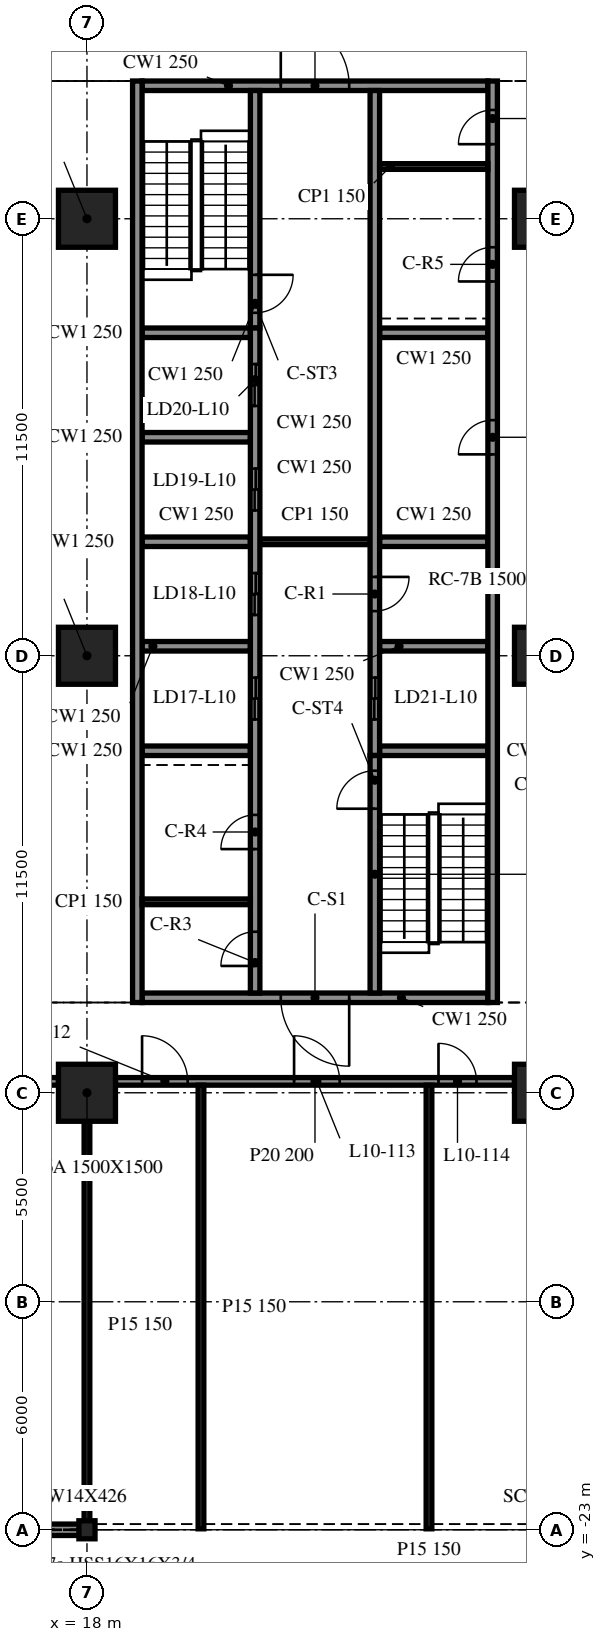
"""IFC4 building model, lengths in metres.
Left out: names, types, materials, properties, quantities, classifications, styles, units other than length and angle.
Written with IfcOpenShell. Run it as: python <this file> out.ifc"""

import sys

from ifc_helpers import new_model, si_unit, direction, frame, frame_2d, origin, origin_2d, place, context, subcontext, project, spatial, rectangle, i_section, extrude, element, fill, save


model = new_model("IFC4")
c1 = context("Model", 3, precision=1e-05, world=origin(), true_north=direction((0.0, 1.0)))
c2 = subcontext(c1, "Body", "Model", "MODEL_VIEW")
j1 = project(units=[si_unit("LENGTHUNIT", "METRE"), si_unit("PLANEANGLEUNIT", "RADIAN")], contexts=[c1])
p1 = place(None, origin())
s1 = spatial("IfcSite", under=j1, at=p1, CompositionType="ELEMENT")
p2 = place(p1, origin())
s2 = spatial("IfcBuilding", under=s1, at=p2, CompositionType="ELEMENT")
p3 = place(p2, frame((0.0, 0.0, 46.0)))
s3 = spatial("IfcBuildingStorey", under=s2, at=p3, CompositionType="ELEMENT", Elevation=46.0)
for number, where, z_axis, x_axis in (
    (1, (18.0, -11.5, -0.34), (0.0, 0.0, 1.0), (1.0, 0.0, 0.0)),
    (2, (18.0, 0.0, -0.34), (0.0, 0.0, 1.0), (1.0, 0.0, 0.0)),
    (3, (18.0, 11.5, -0.34), (0.0, 0.0, 1.0), (1.0, 0.0, 0.0)),
    (4, (30.0, -11.5, -0.34), (0.0, 0.0, 1.0), (1.0, 0.0, 0.0)),
    (5, (30.0, 0.0, -0.34), (0.0, 0.0, 1.0), (1.0, 0.0, 0.0)),
    (6, (30.0, 11.5, -0.34), (0.0, 0.0, 1.0), (1.0, 0.0, 0.0)),
):
    element("IfcColumn", number, at=place(p3, frame(where, z_axis=z_axis, x_axis=x_axis)), inside=s3, PredefinedType="COLUMN", context=c2, shape_type="SweptSolid", body=[
        extrude(rectangle(XDim=1.5, YDim=1.5, at=origin_2d()), origin(), (0.0, 0.0, 1.0), 4.3),
    ])
p4 = place(p3, frame((18.0, -23.0, -0.34), z_axis=(0.0, 0.0, 1.0), x_axis=(1.0, 0.0, 0.0)))
e7 = element("IfcColumn", 7, at=p4, inside=s3, PredefinedType="COLUMN", context=c2, shape_type="SweptSolid", body=[
    extrude(i_section(OverallWidth=0.424, OverallDepth=0.475, WebThickness=0.048, FlangeThickness=0.077, at=origin_2d()), origin(), (0.0, 0.0, 1.0), 4.3),
])
p5 = place(p3, frame((6.024, -23.0, 0.0), z_axis=(0.0, 0.0, 1.0), x_axis=(1.0, 0.0, 0.0)))
e8 = element("IfcWall", 8, at=p5, inside=s3, PredefinedType="NOTDEFINED", context=c2, shape_type="SweptSolid", body=[
    extrude(rectangle(XDim=11.952, YDim=0.3, at=frame_2d((5.976, 0.0))), origin(), (0.0, 0.0, 1.0), 3.203),
])
p6 = place(p3, frame((19.325, 15.125, 0.0), z_axis=(0.0, 0.0, 1.0), x_axis=(0.0, -1.0, 0.0)))
e9 = element("IfcWall", 9, at=p6, inside=s3, PredefinedType="SOLIDWALL", context=c2, shape_type="SweptSolid", body=[
    extrude(rectangle(XDim=24.25, YDim=0.25, at=frame_2d((12.125, 0.0))), origin(), (0.0, 0.0, 1.0), 3.96),
])
p7 = place(p3, frame((28.675, -9.125, 0.0), z_axis=(0.0, 0.0, 1.0), x_axis=(0.0, 1.0, 0.0)))
e10 = element("IfcWall", 10, at=p7, inside=s3, PredefinedType="SOLIDWALL", context=c2, shape_type="SweptSolid", body=[
    extrude(rectangle(XDim=24.25, YDim=0.25, at=frame_2d((12.125, 0.0))), origin(), (0.0, 0.0, 1.0), 3.96),
])
p8 = place(p7, frame((14.425, 0.0, 0.0)))
e11 = element("IfcOpeningElement", 11, at=p8, cuts=e10, PredefinedType="OPENING", context=c2, shape_type="SweptSolid", body=[
    extrude(rectangle(XDim=0.9, YDim=2.1, at=frame_2d((0.45, 1.05))), frame((0.0, 0.135, 0.0), z_axis=(0.0, -1.0, 0.0), x_axis=(1.0, 0.0, 0.0)), (0.0, 0.0, 1.0), 0.27),
])
p9 = place(p7, frame((18.975, 0.0, 0.0)))
e12 = element("IfcOpeningElement", 12, at=p9, cuts=e10, PredefinedType="OPENING", context=c2, shape_type="SweptSolid", body=[
    extrude(rectangle(XDim=0.9, YDim=2.1, at=frame_2d((0.45, 1.05))), frame((0.0, 0.135, 0.0), z_axis=(0.0, -1.0, 0.0), x_axis=(1.0, 0.0, 0.0)), (0.0, 0.0, 1.0), 0.27),
])
p10 = place(p7, frame((22.587, 0.0, 0.0)))
e13 = element("IfcOpeningElement", 13, at=p10, cuts=e10, PredefinedType="OPENING", context=c2, shape_type="SweptSolid", body=[
    extrude(rectangle(XDim=0.9, YDim=2.1, at=frame_2d((0.45, 1.05))), frame((0.0, 0.135, 0.0), z_axis=(0.0, -1.0, 0.0), x_axis=(1.0, 0.0, 0.0)), (0.0, 0.0, 1.0), 0.27),
])
p11 = place(p3, frame((28.55, -9.0, 0.0), z_axis=(0.0, 0.0, 1.0), x_axis=(-1.0, 0.0, 0.0)))
e14 = element("IfcWall", 14, at=p11, inside=s3, PredefinedType="SOLIDWALL", context=c2, shape_type="SweptSolid", body=[
    extrude(rectangle(XDim=9.1, YDim=0.25, at=frame_2d((4.55, 0.0))), origin(), (0.0, 0.0, 1.0), 3.96),
])
p12 = place(p11, frame((3.65, 0.0, 0.0)))
e15 = element("IfcOpeningElement", 15, at=p12, cuts=e14, PredefinedType="OPENING", context=c2, shape_type="SweptSolid", body=[
    extrude(rectangle(XDim=1.8, YDim=2.1, at=frame_2d((0.9, 1.05))), frame((0.0, 0.135, 0.0), z_axis=(0.0, -1.0, 0.0), x_axis=(1.0, 0.0, 0.0)), (0.0, 0.0, 1.0), 0.27),
])
p13 = place(p3, frame((19.45, 15.0, 0.0), z_axis=(0.0, 0.0, 1.0), x_axis=(1.0, 0.0, 0.0)))
e16 = element("IfcWall", 16, at=p13, inside=s3, PredefinedType="SOLIDWALL", context=c2, shape_type="SweptSolid", body=[
    extrude(rectangle(XDim=9.1, YDim=0.25, at=frame_2d((4.55, 0.0))), origin(), (0.0, 0.0, 1.0), 3.96),
])
p14 = place(p13, frame((3.65, 0.0, 0.0)))
e17 = element("IfcOpeningElement", 17, at=p14, cuts=e16, PredefinedType="OPENING", context=c2, shape_type="SweptSolid", body=[
    extrude(rectangle(XDim=1.8, YDim=2.1, at=frame_2d((0.9, 1.05))), frame((0.0, 0.135, 0.0), z_axis=(0.0, -1.0, 0.0), x_axis=(1.0, 0.0, 0.0)), (0.0, 0.0, 1.0), 0.27),
])
p15 = place(p3, frame((22.425, -8.875, 0.0), z_axis=(0.0, 0.0, 1.0), x_axis=(0.0, 1.0, 0.0)))
e18 = element("IfcWall", 18, at=p15, inside=s3, PredefinedType="SOLIDWALL", context=c2, shape_type="SweptSolid", body=[
    extrude(rectangle(XDim=17.5, YDim=0.25, at=frame_2d((8.75, 0.0))), origin(), (0.0, 0.0, 1.0), 3.96),
])
p16 = place(p15, frame((7.2, 0.0, 0.0)))
e19 = element("IfcOpeningElement", 19, at=p16, cuts=e18, PredefinedType="OPENING", context=c2, shape_type="SweptSolid", body=[
    extrude(rectangle(XDim=1.1, YDim=2.1, at=frame_2d((0.55, 1.05))), frame((0.0, 0.135, 0.0), z_axis=(0.0, -1.0, 0.0), x_axis=(1.0, 0.0, 0.0)), (0.0, 0.0, 1.0), 0.27),
])
p17 = place(p15, frame((9.95, 0.0, 0.0)))
e20 = element("IfcOpeningElement", 20, at=p17, cuts=e18, PredefinedType="OPENING", context=c2, shape_type="SweptSolid", body=[
    extrude(rectangle(XDim=1.1, YDim=2.1, at=frame_2d((0.55, 1.05))), frame((0.0, 0.135, 0.0), z_axis=(0.0, -1.0, 0.0), x_axis=(1.0, 0.0, 0.0)), (0.0, 0.0, 1.0), 0.27),
])
p18 = place(p15, frame((12.7, 0.0, 0.0)))
e21 = element("IfcOpeningElement", 21, at=p18, cuts=e18, PredefinedType="OPENING", context=c2, shape_type="SweptSolid", body=[
    extrude(rectangle(XDim=1.1, YDim=2.1, at=frame_2d((0.55, 1.05))), frame((0.0, 0.135, 0.0), z_axis=(0.0, -1.0, 0.0), x_axis=(1.0, 0.0, 0.0)), (0.0, 0.0, 1.0), 0.27),
])
p19 = place(p15, frame((15.45, 0.0, 0.0)))
e22 = element("IfcOpeningElement", 22, at=p19, cuts=e18, PredefinedType="OPENING", context=c2, shape_type="SweptSolid", body=[
    extrude(rectangle(XDim=1.1, YDim=2.1, at=frame_2d((0.55, 1.05))), frame((0.0, 0.135, 0.0), z_axis=(0.0, -1.0, 0.0), x_axis=(1.0, 0.0, 0.0)), (0.0, 0.0, 1.0), 0.27),
])
p20 = place(p15, frame((0.712, 0.0, 0.0)))
e23 = element("IfcOpeningElement", 23, at=p20, cuts=e18, PredefinedType="OPENING", context=c2, shape_type="SweptSolid", body=[
    extrude(rectangle(XDim=0.9, YDim=2.1, at=frame_2d((0.45, 1.05))), frame((0.0, 0.135, 0.0), z_axis=(0.0, -1.0, 0.0), x_axis=(1.0, 0.0, 0.0)), (0.0, 0.0, 1.0), 0.27),
])
p21 = place(p15, frame((3.788, 0.0, 0.0)))
e24 = element("IfcOpeningElement", 24, at=p21, cuts=e18, PredefinedType="OPENING", context=c2, shape_type="SweptSolid", body=[
    extrude(rectangle(XDim=0.9, YDim=2.1, at=frame_2d((0.45, 1.05))), frame((0.0, 0.135, 0.0), z_axis=(0.0, -1.0, 0.0), x_axis=(1.0, 0.0, 0.0)), (0.0, 0.0, 1.0), 0.27),
])
p22 = place(p3, frame((22.425, 14.875, 0.0), z_axis=(0.0, 0.0, 1.0), x_axis=(0.0, -1.0, 0.0)))
e25 = element("IfcWall", 25, at=p22, inside=s3, PredefinedType="SOLIDWALL", context=c2, shape_type="SweptSolid", body=[
    extrude(rectangle(XDim=6.25, YDim=0.25, at=frame_2d((3.125, 0.0))), origin(), (0.0, 0.0, 1.0), 3.96),
])
p23 = place(p22, frame((4.85, 0.0, 0.0)))
e26 = element("IfcOpeningElement", 26, at=p23, cuts=e25, PredefinedType="OPENING", context=c2, shape_type="SweptSolid", body=[
    extrude(rectangle(XDim=1.0, YDim=2.1, at=frame_2d((0.5, 1.05))), frame((0.0, 0.135, 0.0), z_axis=(0.0, -1.0, 0.0), x_axis=(1.0, 0.0, 0.0)), (0.0, 0.0, 1.0), 0.27),
])
p24 = place(p3, frame((25.575, -8.875, 0.0), z_axis=(0.0, 0.0, 1.0), x_axis=(0.0, 1.0, 0.0)))
e27 = element("IfcWall", 27, at=p24, inside=s3, PredefinedType="SOLIDWALL", context=c2, shape_type="SweptSolid", body=[
    extrude(rectangle(XDim=6.25, YDim=0.25, at=frame_2d((3.125, 0.0))), origin(), (0.0, 0.0, 1.0), 3.96),
])
p25 = place(p24, frame((4.85, 0.0, 0.0)))
e28 = element("IfcOpeningElement", 28, at=p25, cuts=e27, PredefinedType="OPENING", context=c2, shape_type="SweptSolid", body=[
    extrude(rectangle(XDim=1.0, YDim=2.1, at=frame_2d((0.5, 1.05))), frame((0.0, 0.135, 0.0), z_axis=(0.0, -1.0, 0.0), x_axis=(1.0, 0.0, 0.0)), (0.0, 0.0, 1.0), 0.27),
])
p26 = place(p3, frame((25.575, 14.875, 0.0), z_axis=(0.0, 0.0, 1.0), x_axis=(0.0, -1.0, 0.0)))
e29 = element("IfcWall", 29, at=p26, inside=s3, PredefinedType="SOLIDWALL", context=c2, shape_type="SweptSolid", body=[
    extrude(rectangle(XDim=17.5, YDim=0.25, at=frame_2d((8.75, 0.0))), origin(), (0.0, 0.0, 1.0), 3.96),
])
p27 = place(p26, frame((15.45, 0.0, 0.0)))
e30 = element("IfcOpeningElement", 30, at=p27, cuts=e29, PredefinedType="OPENING", context=c2, shape_type="SweptSolid", body=[
    extrude(rectangle(XDim=1.1, YDim=2.1, at=frame_2d((0.55, 1.05))), frame((0.0, 0.135, 0.0), z_axis=(0.0, -1.0, 0.0), x_axis=(1.0, 0.0, 0.0)), (0.0, 0.0, 1.0), 0.27),
])
p28 = place(p26, frame((12.8, 0.0, 0.0)))
e31 = element("IfcOpeningElement", 31, at=p28, cuts=e29, PredefinedType="OPENING", context=c2, shape_type="SweptSolid", body=[
    extrude(rectangle(XDim=0.9, YDim=2.1, at=frame_2d((0.45, 1.05))), frame((0.0, 0.135, 0.0), z_axis=(0.0, -1.0, 0.0), x_axis=(1.0, 0.0, 0.0)), (0.0, 0.0, 1.0), 0.27),
])
for number, where, z_axis, x_axis in (
    (32, (19.45, -2.5, 0.0), (0.0, 0.0, 1.0), (1.0, 0.0, 0.0)),
    (33, (19.45, 0.25, 0.0), (0.0, 0.0, 1.0), (1.0, 0.0, 0.0)),
    (34, (19.45, 3.0, 0.0), (0.0, 0.0, 1.0), (1.0, 0.0, 0.0)),
    (35, (19.45, 5.75, 0.0), (0.0, 0.0, 1.0), (1.0, 0.0, 0.0)),
    (36, (19.45, 8.5, 0.0), (0.0, 0.0, 1.0), (1.0, 0.0, 0.0)),
    (37, (25.7, -2.5, 0.0), (0.0, 0.0, 1.0), (1.0, 0.0, 0.0)),
    (38, (25.7, 0.25, 0.0), (0.0, 0.0, 1.0), (1.0, 0.0, 0.0)),
    (39, (25.7, 3.0, 0.0), (0.0, 0.0, 1.0), (1.0, 0.0, 0.0)),
    (40, (25.7, 8.5, 0.0), (0.0, 0.0, 1.0), (1.0, 0.0, 0.0)),
):
    element("IfcWall", number, at=place(p3, frame(where, z_axis=z_axis, x_axis=x_axis)), inside=s3, PredefinedType="SOLIDWALL", context=c2, shape_type="SweptSolid", body=[
        extrude(rectangle(XDim=2.85, YDim=0.25, at=frame_2d((1.425, 0.0))), origin(), (0.0, 0.0, 1.0), 3.96),
    ])
p29 = place(p3, frame((22.55, 3.0, 0.0), z_axis=(0.0, 0.0, 1.0), x_axis=(1.0, 0.0, 0.0)))
e41 = element("IfcWall", 41, at=p29, inside=s3, PredefinedType="PARTITIONING", context=c2, shape_type="SweptSolid", body=[
    extrude(rectangle(XDim=2.9, YDim=0.15, at=frame_2d((1.45, 0.0))), origin(), (0.0, 0.0, 1.0), 3.96),
])
for number, where, z_axis, x_axis in (
    (42, (19.45, -6.475, 0.0), (0.0, 0.0, 1.0), (1.0, 0.0, 0.0)),
    (43, (25.7, 12.875, 0.0), (0.0, 0.0, 1.0), (1.0, 0.0, 0.0)),
):
    element("IfcWall", number, at=place(p3, frame(where, z_axis=z_axis, x_axis=x_axis)), inside=s3, PredefinedType="PARTITIONING", context=c2, shape_type="SweptSolid", body=[
        extrude(rectangle(XDim=2.85, YDim=0.15, at=frame_2d((1.425, 0.0))), origin(), (0.0, 0.0, 1.0), 3.96),
    ])
p30 = place(p3, frame((6.75, -11.2, 0.0), z_axis=(0.0, 0.0, 1.0), x_axis=(1.0, 0.0, 0.0)))
e44 = element("IfcWall", 44, at=p30, inside=s3, PredefinedType="PARTITIONING", context=c2, shape_type="SweptSolid", body=[
    extrude(rectangle(XDim=10.5, YDim=0.2, at=frame_2d((5.25, 0.0))), origin(), (0.0, 0.0, 1.0), 3.96),
])
p31 = place(p30, frame((3.7, 0.0, 0.0)))
e45 = element("IfcOpeningElement", 45, at=p31, cuts=e44, PredefinedType="OPENING", context=c2, shape_type="SweptSolid", body=[
    extrude(rectangle(XDim=1.2, YDim=2.1, at=frame_2d((0.6, 1.05))), frame((0.0, 0.11, 0.0), z_axis=(0.0, -1.0, 0.0), x_axis=(1.0, 0.0, 0.0)), (0.0, 0.0, 1.0), 0.22),
])
p32 = place(p30, frame((5.5, 0.0, 0.0)))
e46 = element("IfcOpeningElement", 46, at=p32, cuts=e44, PredefinedType="OPENING", context=c2, shape_type="SweptSolid", body=[
    extrude(rectangle(XDim=1.0, YDim=2.1, at=frame_2d((0.5, 1.05))), frame((0.0, 0.11, 0.0), z_axis=(0.0, -1.0, 0.0), x_axis=(1.0, 0.0, 0.0)), (0.0, 0.0, 1.0), 0.22),
])
p33 = place(p3, frame((18.75, -11.2, 0.0), z_axis=(0.0, 0.0, 1.0), x_axis=(1.0, 0.0, 0.0)))
e47 = element("IfcWall", 47, at=p33, inside=s3, PredefinedType="PARTITIONING", context=c2, shape_type="SweptSolid", body=[
    extrude(rectangle(XDim=10.5, YDim=0.2, at=frame_2d((5.25, 0.0))), origin(), (0.0, 0.0, 1.0), 3.96),
])
p34 = place(p33, frame((0.7, 0.0, 0.0)))
e48 = element("IfcOpeningElement", 48, at=p34, cuts=e47, PredefinedType="OPENING", context=c2, shape_type="SweptSolid", body=[
    extrude(rectangle(XDim=1.2, YDim=2.1, at=frame_2d((0.6, 1.05))), frame((0.0, 0.11, 0.0), z_axis=(0.0, -1.0, 0.0), x_axis=(1.0, 0.0, 0.0)), (0.0, 0.0, 1.0), 0.22),
])
p35 = place(p33, frame((4.7, 0.0, 0.0)))
e49 = element("IfcOpeningElement", 49, at=p35, cuts=e47, PredefinedType="OPENING", context=c2, shape_type="SweptSolid", body=[
    extrude(rectangle(XDim=1.2, YDim=2.1, at=frame_2d((0.6, 1.05))), frame((0.0, 0.11, 0.0), z_axis=(0.0, -1.0, 0.0), x_axis=(1.0, 0.0, 0.0)), (0.0, 0.0, 1.0), 0.22),
])
p36 = place(p33, frame((8.5, 0.0, 0.0)))
e50 = element("IfcOpeningElement", 50, at=p36, cuts=e47, PredefinedType="OPENING", context=c2, shape_type="SweptSolid", body=[
    extrude(rectangle(XDim=1.0, YDim=2.1, at=frame_2d((0.5, 1.05))), frame((0.0, 0.11, 0.0), z_axis=(0.0, -1.0, 0.0), x_axis=(1.0, 0.0, 0.0)), (0.0, 0.0, 1.0), 0.22),
])
p37 = place(p3, frame((18.0, -22.975, 0.0), z_axis=(0.0, 0.0, 1.0), x_axis=(0.0, 1.0, 0.0)))
e51 = element("IfcWall", 51, at=p37, inside=s3, PredefinedType="PARTITIONING", context=c2, shape_type="SweptSolid", body=[
    extrude(rectangle(XDim=10.725, YDim=0.15, at=frame_2d((5.363, 0.0))), origin(), (0.0, 0.0, 1.0), 3.96),
])
for number, where, z_axis, x_axis in (
    (52, (21.0, -22.975, 0.0), (0.0, 0.0, 1.0), (0.0, 1.0, 0.0)),
    (53, (27.0, -22.975, 0.0), (0.0, 0.0, 1.0), (0.0, 1.0, 0.0)),
):
    element("IfcWall", number, at=place(p3, frame(where, z_axis=z_axis, x_axis=x_axis)), inside=s3, PredefinedType="PARTITIONING", context=c2, shape_type="SweptSolid", body=[
        extrude(rectangle(XDim=11.675, YDim=0.15, at=frame_2d((5.837, 0.0))), origin(), (0.0, 0.0, 1.0), 3.96),
    ])
p38 = place(p12, origin())
e54 = element("IfcDoor", 54, at=p38, inside=s3, OperationType="DOUBLE_DOOR_SINGLE_SWING", PredefinedType="DOOR", context=c2, shape_type="SweptSolid", body=[
    extrude(rectangle(XDim=1.8, YDim=2.1, at=frame_2d((0.9, 1.05))), frame((0.0, 0.025, 0.0), z_axis=(0.0, -1.0, 0.0), x_axis=(1.0, 0.0, 0.0)), (0.0, 0.0, 1.0), 0.05),
])
fill(e15, e54)
p39 = place(p14, origin())
e55 = element("IfcDoor", 55, at=p39, inside=s3, OperationType="DOUBLE_DOOR_SINGLE_SWING", PredefinedType="DOOR", context=c2, shape_type="SweptSolid", body=[
    extrude(rectangle(XDim=1.8, YDim=2.1, at=frame_2d((0.9, 1.05))), frame((0.0, 0.025, 0.0), z_axis=(0.0, -1.0, 0.0), x_axis=(1.0, 0.0, 0.0)), (0.0, 0.0, 1.0), 0.05),
])
fill(e17, e55)
p40 = place(p27, origin())
e56 = element("IfcDoor", 56, at=p40, inside=s3, OperationType="DOUBLE_DOOR_SLIDING", PredefinedType="DOOR", context=c2, shape_type="SweptSolid", body=[
    extrude(rectangle(XDim=1.1, YDim=2.1, at=frame_2d((0.55, 1.05))), frame((0.0, 0.025, 0.0), z_axis=(0.0, -1.0, 0.0), x_axis=(1.0, 0.0, 0.0)), (0.0, 0.0, 1.0), 0.05),
])
fill(e30, e56)
p41 = place(p16, origin())
e57 = element("IfcDoor", 57, at=p41, inside=s3, OperationType="DOUBLE_DOOR_SLIDING", PredefinedType="DOOR", context=c2, shape_type="SweptSolid", body=[
    extrude(rectangle(XDim=1.1, YDim=2.1, at=frame_2d((0.55, 1.05))), frame((0.0, 0.025, 0.0), z_axis=(0.0, -1.0, 0.0), x_axis=(1.0, 0.0, 0.0)), (0.0, 0.0, 1.0), 0.05),
])
fill(e19, e57)
p42 = place(p17, origin())
e58 = element("IfcDoor", 58, at=p42, inside=s3, OperationType="DOUBLE_DOOR_SLIDING", PredefinedType="DOOR", context=c2, shape_type="SweptSolid", body=[
    extrude(rectangle(XDim=1.1, YDim=2.1, at=frame_2d((0.55, 1.05))), frame((0.0, 0.025, 0.0), z_axis=(0.0, -1.0, 0.0), x_axis=(1.0, 0.0, 0.0)), (0.0, 0.0, 1.0), 0.05),
])
fill(e20, e58)
p43 = place(p18, origin())
e59 = element("IfcDoor", 59, at=p43, inside=s3, OperationType="DOUBLE_DOOR_SLIDING", PredefinedType="DOOR", context=c2, shape_type="SweptSolid", body=[
    extrude(rectangle(XDim=1.1, YDim=2.1, at=frame_2d((0.55, 1.05))), frame((0.0, 0.025, 0.0), z_axis=(0.0, -1.0, 0.0), x_axis=(1.0, 0.0, 0.0)), (0.0, 0.0, 1.0), 0.05),
])
fill(e21, e59)
p44 = place(p19, origin())
e60 = element("IfcDoor", 60, at=p44, inside=s3, OperationType="DOUBLE_DOOR_SLIDING", PredefinedType="DOOR", context=c2, shape_type="SweptSolid", body=[
    extrude(rectangle(XDim=1.1, YDim=2.1, at=frame_2d((0.55, 1.05))), frame((0.0, 0.025, 0.0), z_axis=(0.0, -1.0, 0.0), x_axis=(1.0, 0.0, 0.0)), (0.0, 0.0, 1.0), 0.05),
])
fill(e22, e60)
p45 = place(p28, origin())
e61 = element("IfcDoor", 61, at=p45, inside=s3, OperationType="SINGLE_SWING_LEFT", PredefinedType="DOOR", context=c2, shape_type="SweptSolid", body=[
    extrude(rectangle(XDim=0.9, YDim=2.1, at=frame_2d((0.45, 1.05))), frame((0.0, 0.025, 0.0), z_axis=(0.0, -1.0, 0.0), x_axis=(1.0, 0.0, 0.0)), (0.0, 0.0, 1.0), 0.05),
])
fill(e31, e61)
p46 = place(p8, origin())
e62 = element("IfcDoor", 62, at=p46, inside=s3, OperationType="SINGLE_SWING_RIGHT", PredefinedType="DOOR", context=c2, shape_type="SweptSolid", body=[
    extrude(rectangle(XDim=0.9, YDim=2.1, at=frame_2d((0.45, 1.05))), frame((0.0, 0.025, 0.0), z_axis=(0.0, -1.0, 0.0), x_axis=(1.0, 0.0, 0.0)), (0.0, 0.0, 1.0), 0.05),
])
fill(e11, e62)
p47 = place(p20, origin())
e63 = element("IfcDoor", 63, at=p47, inside=s3, OperationType="SINGLE_SWING_LEFT", PredefinedType="DOOR", context=c2, shape_type="SweptSolid", body=[
    extrude(rectangle(XDim=0.9, YDim=2.1, at=frame_2d((0.45, 1.05))), frame((0.0, 0.025, 0.0), z_axis=(0.0, -1.0, 0.0), x_axis=(1.0, 0.0, 0.0)), (0.0, 0.0, 1.0), 0.05),
])
fill(e23, e63)
p48 = place(p21, origin())
e64 = element("IfcDoor", 64, at=p48, inside=s3, OperationType="SINGLE_SWING_RIGHT", PredefinedType="DOOR", context=c2, shape_type="SweptSolid", body=[
    extrude(rectangle(XDim=0.9, YDim=2.1, at=frame_2d((0.45, 1.05))), frame((0.0, 0.025, 0.0), z_axis=(0.0, -1.0, 0.0), x_axis=(1.0, 0.0, 0.0)), (0.0, 0.0, 1.0), 0.05),
])
fill(e24, e64)
p49 = place(p9, origin())
e65 = element("IfcDoor", 65, at=p49, inside=s3, OperationType="SINGLE_SWING_LEFT", PredefinedType="DOOR", context=c2, shape_type="SweptSolid", body=[
    extrude(rectangle(XDim=0.9, YDim=2.1, at=frame_2d((0.45, 1.05))), frame((0.0, 0.025, 0.0), z_axis=(0.0, -1.0, 0.0), x_axis=(1.0, 0.0, 0.0)), (0.0, 0.0, 1.0), 0.05),
])
fill(e12, e65)
p50 = place(p10, origin())
e66 = element("IfcDoor", 66, at=p50, inside=s3, OperationType="SINGLE_SWING_RIGHT", PredefinedType="DOOR", context=c2, shape_type="SweptSolid", body=[
    extrude(rectangle(XDim=0.9, YDim=2.1, at=frame_2d((0.45, 1.05))), frame((0.0, 0.025, 0.0), z_axis=(0.0, -1.0, 0.0), x_axis=(1.0, 0.0, 0.0)), (0.0, 0.0, 1.0), 0.05),
])
fill(e13, e66)
p51 = place(p23, origin())
e67 = element("IfcDoor", 67, at=p51, inside=s3, OperationType="SINGLE_SWING_LEFT", PredefinedType="DOOR", context=c2, shape_type="SweptSolid", body=[
    extrude(rectangle(XDim=1.0, YDim=2.1, at=frame_2d((0.5, 1.05))), frame((0.0, 0.025, 0.0), z_axis=(0.0, -1.0, 0.0), x_axis=(1.0, 0.0, 0.0)), (0.0, 0.0, 1.0), 0.05),
])
fill(e26, e67)
p52 = place(p25, origin())
e68 = element("IfcDoor", 68, at=p52, inside=s3, OperationType="SINGLE_SWING_RIGHT", PredefinedType="DOOR", context=c2, shape_type="SweptSolid", body=[
    extrude(rectangle(XDim=1.0, YDim=2.1, at=frame_2d((0.5, 1.05))), frame((0.0, 0.025, 0.0), z_axis=(0.0, -1.0, 0.0), x_axis=(1.0, 0.0, 0.0)), (0.0, 0.0, 1.0), 0.05),
])
fill(e28, e68)
p53 = place(p34, origin())
e69 = element("IfcDoor", 69, at=p53, inside=s3, OperationType="SINGLE_SWING_RIGHT", PredefinedType="DOOR", context=c2, shape_type="SweptSolid", body=[
    extrude(rectangle(XDim=1.2, YDim=2.1, at=frame_2d((0.6, 1.05))), frame((0.0, 0.025, 0.0), z_axis=(0.0, -1.0, 0.0), x_axis=(1.0, 0.0, 0.0)), (0.0, 0.0, 1.0), 0.05),
])
fill(e48, e69)
p54 = place(p35, origin())
e70 = element("IfcDoor", 70, at=p54, inside=s3, OperationType="SINGLE_SWING_LEFT", PredefinedType="DOOR", context=c2, shape_type="SweptSolid", body=[
    extrude(rectangle(XDim=1.2, YDim=2.1, at=frame_2d((0.6, 1.05))), frame((0.0, 0.025, 0.0), z_axis=(0.0, -1.0, 0.0), x_axis=(1.0, 0.0, 0.0)), (0.0, 0.0, 1.0), 0.05),
])
fill(e49, e70)
p55 = place(p36, origin())
e71 = element("IfcDoor", 71, at=p55, inside=s3, OperationType="SINGLE_SWING_LEFT", PredefinedType="DOOR", context=c2, shape_type="SweptSolid", body=[
    extrude(rectangle(XDim=1.0, YDim=2.1, at=frame_2d((0.5, 1.05))), frame((0.0, 0.025, 0.0), z_axis=(0.0, -1.0, 0.0), x_axis=(1.0, 0.0, 0.0)), (0.0, 0.0, 1.0), 0.05),
])
fill(e50, e71)
save(model, sys.argv[1])
